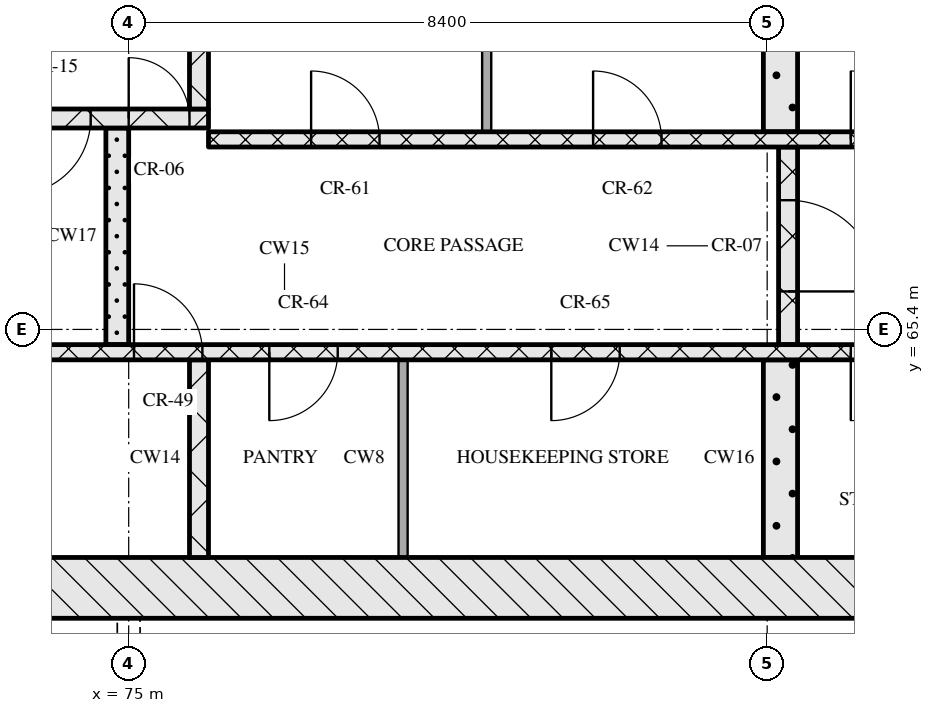
"""IFC4 building model, lengths in metres.
Left out: names, types, materials, properties, quantities, classifications, styles, units other than length and angle.
Written with IfcOpenShell. Run it as: python <this file> out.ifc"""

import sys

from ifc_helpers import new_model, si_unit, direction, frame, frame_2d, origin, place, context, subcontext, project, spatial, rectangle, extrude, element, fill, save


model = new_model("IFC4")
c1 = context("Model", 3, precision=1e-05, world=origin(), true_north=direction((0.0, 1.0)))
c2 = subcontext(c1, "Body", "Model", "MODEL_VIEW")
j1 = project(units=[si_unit("LENGTHUNIT", "METRE"), si_unit("PLANEANGLEUNIT", "RADIAN")], contexts=[c1])
p1 = place(None, origin())
s1 = spatial("IfcSite", under=j1, at=p1, CompositionType="ELEMENT")
p2 = place(p1, origin())
s2 = spatial("IfcBuilding", under=s1, at=p2, CompositionType="ELEMENT")
p3 = place(p2, frame((0.0, 0.0, 169.05)))
s3 = spatial("IfcBuildingStorey", under=s2, at=p3, CompositionType="ELEMENT", Elevation=169.05)
p4 = place(p3, frame((67.0, 62.0, 0.0), z_axis=(0.0, 0.0, 1.0), x_axis=(1.0, 0.0, 0.0)))
e1 = element("IfcWall", 1, at=p4, inside=s3, PredefinedType="SOLIDWALL", context=c2, shape_type="SweptSolid", body=[
    extrude(rectangle(XDim=41.2, YDim=0.8, at=frame_2d((20.6, 0.0))), origin(), (0.0, 0.0, 1.0), 3.32),
])
p5 = place(p4, frame((20.95, 0.0, 0.0)))
e2 = element("IfcOpeningElement", 2, at=p5, cuts=e1, PredefinedType="OPENING", context=c2, shape_type="SweptSolid", body=[
    extrude(rectangle(XDim=1.8, YDim=2.1, at=frame_2d((0.9, 1.05))), frame((0.0, 0.41, 0.0), z_axis=(0.0, -1.0, 0.0), x_axis=(1.0, 0.0, 0.0)), (0.0, 0.0, 1.0), 0.82),
])
p6 = place(p3, frame((75.925, 62.4, 0.0), z_axis=(0.0, 0.0, 1.0), x_axis=(0.0, 1.0, 0.0)))
e3 = element("IfcWall", 3, at=p6, inside=s3, PredefinedType="SOLIDWALL", context=c2, shape_type="SweptSolid", body=[
    extrude(rectangle(XDim=2.6, YDim=0.25, at=frame_2d((1.3, 0.0))), origin(), (0.0, 0.0, 1.0), 3.32),
])
p7 = place(p3, frame((78.61, 62.4, 0.0), z_axis=(0.0, 0.0, 1.0), x_axis=(0.0, 1.0, 0.0)))
e4 = element("IfcWall", 4, at=p7, inside=s3, PredefinedType="PARTITIONING", context=c2, shape_type="SweptSolid", body=[
    extrude(rectangle(XDim=2.6, YDim=0.12, at=frame_2d((1.3, 0.0))), origin(), (0.0, 0.0, 1.0), 3.32),
])
p8 = place(p3, frame((83.575, 62.4, 0.0), z_axis=(0.0, 0.0, 1.0), x_axis=(0.0, 1.0, 0.0)))
e5 = element("IfcWall", 5, at=p8, inside=s3, PredefinedType="SOLIDWALL", context=c2, shape_type="SweptSolid", body=[
    extrude(rectangle(XDim=2.6, YDim=0.45, at=frame_2d((1.3, 0.0))), origin(), (0.0, 0.0, 1.0), 3.32),
])
p9 = place(p3, frame((67.8, 65.1, 0.0), z_axis=(0.0, 0.0, 1.0), x_axis=(1.0, 0.0, 0.0)))
e6 = element("IfcWall", 6, at=p9, inside=s3, PredefinedType="SOLIDWALL", context=c2, shape_type="SweptSolid", body=[
    extrude(rectangle(XDim=18.5, YDim=0.2, at=frame_2d((9.25, 0.0))), origin(), (0.0, 0.0, 1.0), 3.32),
])
p10 = place(p9, frame((7.27, 0.0, 0.0)))
e7 = element("IfcOpeningElement", 7, at=p10, cuts=e6, PredefinedType="OPENING", context=c2, shape_type="SweptSolid", body=[
    extrude(rectangle(XDim=0.9, YDim=2.1, at=frame_2d((0.45, 1.05))), frame((0.0, 0.11, 0.0), z_axis=(0.0, -1.0, 0.0), x_axis=(1.0, 0.0, 0.0)), (0.0, 0.0, 1.0), 0.22),
])
p11 = place(p9, frame((9.05, 0.0, 0.0)))
e8 = element("IfcOpeningElement", 8, at=p11, cuts=e6, PredefinedType="OPENING", context=c2, shape_type="SweptSolid", body=[
    extrude(rectangle(XDim=0.9, YDim=2.1, at=frame_2d((0.45, 1.05))), frame((0.0, 0.11, 0.0), z_axis=(0.0, -1.0, 0.0), x_axis=(1.0, 0.0, 0.0)), (0.0, 0.0, 1.0), 0.22),
])
p12 = place(p9, frame((12.76, 0.0, 0.0)))
e9 = element("IfcOpeningElement", 9, at=p12, cuts=e6, PredefinedType="OPENING", context=c2, shape_type="SweptSolid", body=[
    extrude(rectangle(XDim=0.9, YDim=2.1, at=frame_2d((0.45, 1.05))), frame((0.0, 0.11, 0.0), z_axis=(0.0, -1.0, 0.0), x_axis=(1.0, 0.0, 0.0)), (0.0, 0.0, 1.0), 0.22),
])
p13 = place(p9, frame((16.7, 0.0, 0.0)))
e10 = element("IfcOpeningElement", 10, at=p13, cuts=e6, PredefinedType="OPENING", context=c2, shape_type="SweptSolid", body=[
    extrude(rectangle(XDim=0.9, YDim=2.1, at=frame_2d((0.45, 1.05))), frame((0.0, 0.11, 0.0), z_axis=(0.0, -1.0, 0.0), x_axis=(1.0, 0.0, 0.0)), (0.0, 0.0, 1.0), 0.22),
])
p14 = place(p3, frame((74.85, 65.2, 0.0), z_axis=(0.0, 0.0, 1.0), x_axis=(0.0, 1.0, 0.0)))
e11 = element("IfcWall", 11, at=p14, inside=s3, PredefinedType="SOLIDWALL", context=c2, shape_type="SweptSolid", body=[
    extrude(rectangle(XDim=2.85, YDim=0.3, at=frame_2d((1.425, 0.0))), origin(), (0.0, 0.0, 1.0), 3.32),
])
p15 = place(p3, frame((83.675, 65.2, 0.0), z_axis=(0.0, 0.0, 1.0), x_axis=(0.0, 1.0, 0.0)))
e12 = element("IfcWall", 12, at=p15, inside=s3, PredefinedType="SOLIDWALL", context=c2, shape_type="SweptSolid", body=[
    extrude(rectangle(XDim=2.6, YDim=0.25, at=frame_2d((1.3, 0.0))), origin(), (0.0, 0.0, 1.0), 3.32),
])
p16 = place(p15, frame((0.7, 0.0, 0.0)))
e13 = element("IfcOpeningElement", 13, at=p16, cuts=e12, PredefinedType="OPENING", context=c2, shape_type="SweptSolid", body=[
    extrude(rectangle(XDim=1.2, YDim=2.1, at=frame_2d((0.6, 1.05))), frame((0.0, 0.135, 0.0), z_axis=(0.0, -1.0, 0.0), x_axis=(1.0, 0.0, 0.0)), (0.0, 0.0, 1.0), 0.27),
])
p17 = place(p3, frame((76.05, 67.9, 0.0), z_axis=(0.0, 0.0, 1.0), x_axis=(1.0, 0.0, 0.0)))
e14 = element("IfcWall", 14, at=p17, inside=s3, PredefinedType="SOLIDWALL", context=c2, shape_type="SweptSolid", body=[
    extrude(rectangle(XDim=23.1, YDim=0.2, at=frame_2d((11.55, 0.0))), origin(), (0.0, 0.0, 1.0), 3.32),
])
p18 = place(p17, frame((1.35, 0.0, 0.0)))
e15 = element("IfcOpeningElement", 15, at=p18, cuts=e14, PredefinedType="OPENING", context=c2, shape_type="SweptSolid", body=[
    extrude(rectangle(XDim=0.9, YDim=2.1, at=frame_2d((0.45, 1.05))), frame((0.0, 0.11, 0.0), z_axis=(0.0, -1.0, 0.0), x_axis=(1.0, 0.0, 0.0)), (0.0, 0.0, 1.0), 0.22),
])
p19 = place(p17, frame((5.06, 0.0, 0.0)))
e16 = element("IfcOpeningElement", 16, at=p19, cuts=e14, PredefinedType="OPENING", context=c2, shape_type="SweptSolid", body=[
    extrude(rectangle(XDim=0.9, YDim=2.1, at=frame_2d((0.45, 1.05))), frame((0.0, 0.11, 0.0), z_axis=(0.0, -1.0, 0.0), x_axis=(1.0, 0.0, 0.0)), (0.0, 0.0, 1.0), 0.22),
])
p20 = place(p17, frame((8.45, 0.0, 0.0)))
e17 = element("IfcOpeningElement", 17, at=p20, cuts=e14, PredefinedType="OPENING", context=c2, shape_type="SweptSolid", body=[
    extrude(rectangle(XDim=0.9, YDim=2.1, at=frame_2d((0.45, 1.05))), frame((0.0, 0.11, 0.0), z_axis=(0.0, -1.0, 0.0), x_axis=(1.0, 0.0, 0.0)), (0.0, 0.0, 1.0), 0.22),
])
p21 = place(p17, frame((10.91, 0.0, 0.0)))
e18 = element("IfcOpeningElement", 18, at=p21, cuts=e14, PredefinedType="OPENING", context=c2, shape_type="SweptSolid", body=[
    extrude(rectangle(XDim=0.9, YDim=2.1, at=frame_2d((0.45, 1.05))), frame((0.0, 0.11, 0.0), z_axis=(0.0, -1.0, 0.0), x_axis=(1.0, 0.0, 0.0)), (0.0, 0.0, 1.0), 0.22),
])
p22 = place(p17, frame((13.55, 0.0, 0.0)))
e19 = element("IfcOpeningElement", 19, at=p22, cuts=e14, PredefinedType="OPENING", context=c2, shape_type="SweptSolid", body=[
    extrude(rectangle(XDim=1.0, YDim=2.1, at=frame_2d((0.5, 1.05))), frame((0.0, 0.11, 0.0), z_axis=(0.0, -1.0, 0.0), x_axis=(1.0, 0.0, 0.0)), (0.0, 0.0, 1.0), 0.22),
])
p23 = place(p17, frame((16.2, 0.0, 0.0)))
e20 = element("IfcOpeningElement", 20, at=p23, cuts=e14, PredefinedType="OPENING", context=c2, shape_type="SweptSolid", body=[
    extrude(rectangle(XDim=1.1, YDim=2.1, at=frame_2d((0.55, 1.05))), frame((0.0, 0.11, 0.0), z_axis=(0.0, -1.0, 0.0), x_axis=(1.0, 0.0, 0.0)), (0.0, 0.0, 1.0), 0.22),
])
p24 = place(p17, frame((18.7, 0.0, 0.0)))
e21 = element("IfcOpeningElement", 21, at=p24, cuts=e14, PredefinedType="OPENING", context=c2, shape_type="SweptSolid", body=[
    extrude(rectangle(XDim=1.1, YDim=2.1, at=frame_2d((0.55, 1.05))), frame((0.0, 0.11, 0.0), z_axis=(0.0, -1.0, 0.0), x_axis=(1.0, 0.0, 0.0)), (0.0, 0.0, 1.0), 0.22),
])
p25 = place(p17, frame((21.2, 0.0, 0.0)))
e22 = element("IfcOpeningElement", 22, at=p25, cuts=e14, PredefinedType="OPENING", context=c2, shape_type="SweptSolid", body=[
    extrude(rectangle(XDim=1.1, YDim=2.1, at=frame_2d((0.55, 1.05))), frame((0.0, 0.11, 0.0), z_axis=(0.0, -1.0, 0.0), x_axis=(1.0, 0.0, 0.0)), (0.0, 0.0, 1.0), 0.22),
])
p26 = place(p3, frame((79.71, 68.0, 0.0), z_axis=(0.0, 0.0, 1.0), x_axis=(0.0, 1.0, 0.0)))
e23 = element("IfcWall", 23, at=p26, inside=s3, PredefinedType="PARTITIONING", context=c2, shape_type="SweptSolid", body=[
    extrude(rectangle(XDim=2.6, YDim=0.12, at=frame_2d((1.3, 0.0))), origin(), (0.0, 0.0, 1.0), 3.32),
])
p27 = place(p3, frame((83.575, 68.0, 0.0), z_axis=(0.0, 0.0, 1.0), x_axis=(0.0, 1.0, 0.0)))
e24 = element("IfcWall", 24, at=p27, inside=s3, PredefinedType="SOLIDWALL", context=c2, shape_type="SweptSolid", body=[
    extrude(rectangle(XDim=2.6, YDim=0.45, at=frame_2d((1.3, 0.0))), origin(), (0.0, 0.0, 1.0), 3.32),
])
p28 = place(p3, frame((67.8, 68.175, 0.0), z_axis=(0.0, 0.0, 1.0), x_axis=(1.0, 0.0, 0.0)))
e25 = element("IfcWall", 25, at=p28, inside=s3, PredefinedType="SOLIDWALL", context=c2, shape_type="SweptSolid", body=[
    extrude(rectangle(XDim=8.25, YDim=0.25, at=frame_2d((4.125, 0.0))), origin(), (0.0, 0.0, 1.0), 3.32),
])
p29 = place(p28, frame((5.7, 0.0, 0.0)))
e26 = element("IfcOpeningElement", 26, at=p29, cuts=e25, PredefinedType="OPENING", context=c2, shape_type="SweptSolid", body=[
    extrude(rectangle(XDim=1.0, YDim=2.1, at=frame_2d((0.5, 1.05))), frame((0.0, 0.135, 0.0), z_axis=(0.0, -1.0, 0.0), x_axis=(1.0, 0.0, 0.0)), (0.0, 0.0, 1.0), 0.27),
])
p30 = place(p28, frame((7.2, 0.0, 0.0)))
e27 = element("IfcOpeningElement", 27, at=p30, cuts=e25, PredefinedType="OPENING", context=c2, shape_type="SweptSolid", body=[
    extrude(rectangle(XDim=0.8, YDim=2.1, at=frame_2d((0.4, 1.05))), frame((0.0, 0.135, 0.0), z_axis=(0.0, -1.0, 0.0), x_axis=(1.0, 0.0, 0.0)), (0.0, 0.0, 1.0), 0.27),
])
p31 = place(p3, frame((75.925, 68.3, 0.0), z_axis=(0.0, 0.0, 1.0), x_axis=(0.0, 1.0, 0.0)))
e28 = element("IfcWall", 28, at=p31, inside=s3, PredefinedType="SOLIDWALL", context=c2, shape_type="SweptSolid", body=[
    extrude(rectangle(XDim=2.3, YDim=0.25, at=frame_2d((1.15, 0.0))), origin(), (0.0, 0.0, 1.0), 3.32),
])
p32 = place(p10, origin())
e29 = element("IfcDoor", 29, at=p32, inside=s3, OperationType="SINGLE_SWING_LEFT", PredefinedType="DOOR", context=c2, shape_type="SweptSolid", body=[
    extrude(rectangle(XDim=0.9, YDim=2.1, at=frame_2d((0.45, 1.05))), frame((0.0, 0.025, 0.0), z_axis=(0.0, -1.0, 0.0), x_axis=(1.0, 0.0, 0.0)), (0.0, 0.0, 1.0), 0.05),
])
fill(e7, e29)
p33 = place(p11, origin())
e30 = element("IfcDoor", 30, at=p33, inside=s3, OperationType="SINGLE_SWING_RIGHT", PredefinedType="DOOR", context=c2, shape_type="SweptSolid", body=[
    extrude(rectangle(XDim=0.9, YDim=2.1, at=frame_2d((0.45, 1.05))), frame((0.0, 0.025, 0.0), z_axis=(0.0, -1.0, 0.0), x_axis=(1.0, 0.0, 0.0)), (0.0, 0.0, 1.0), 0.05),
])
fill(e8, e30)
p34 = place(p12, origin())
e31 = element("IfcDoor", 31, at=p34, inside=s3, OperationType="SINGLE_SWING_RIGHT", PredefinedType="DOOR", context=c2, shape_type="SweptSolid", body=[
    extrude(rectangle(XDim=0.9, YDim=2.1, at=frame_2d((0.45, 1.05))), frame((0.0, 0.025, 0.0), z_axis=(0.0, -1.0, 0.0), x_axis=(1.0, 0.0, 0.0)), (0.0, 0.0, 1.0), 0.05),
])
fill(e9, e31)
p35 = place(p13, origin())
e32 = element("IfcDoor", 32, at=p35, inside=s3, OperationType="SINGLE_SWING_RIGHT", PredefinedType="DOOR", context=c2, shape_type="SweptSolid", body=[
    extrude(rectangle(XDim=0.9, YDim=2.1, at=frame_2d((0.45, 1.05))), frame((0.0, 0.025, 0.0), z_axis=(0.0, -1.0, 0.0), x_axis=(1.0, 0.0, 0.0)), (0.0, 0.0, 1.0), 0.05),
])
fill(e10, e32)
p36 = place(p16, origin())
e33 = element("IfcDoor", 33, at=p36, inside=s3, OperationType="SINGLE_SWING_RIGHT", PredefinedType="DOOR", context=c2, shape_type="SweptSolid", body=[
    extrude(rectangle(XDim=1.2, YDim=2.1, at=frame_2d((0.6, 1.05))), frame((0.0, 0.025, 0.0), z_axis=(0.0, -1.0, 0.0), x_axis=(1.0, 0.0, 0.0)), (0.0, 0.0, 1.0), 0.05),
])
fill(e13, e33)
p37 = place(p18, origin())
e34 = element("IfcDoor", 34, at=p37, inside=s3, OperationType="SINGLE_SWING_LEFT", PredefinedType="DOOR", context=c2, shape_type="SweptSolid", body=[
    extrude(rectangle(XDim=0.9, YDim=2.1, at=frame_2d((0.45, 1.05))), frame((0.0, 0.025, 0.0), z_axis=(0.0, -1.0, 0.0), x_axis=(1.0, 0.0, 0.0)), (0.0, 0.0, 1.0), 0.05),
])
fill(e15, e34)
p38 = place(p19, origin())
e35 = element("IfcDoor", 35, at=p38, inside=s3, OperationType="SINGLE_SWING_LEFT", PredefinedType="DOOR", context=c2, shape_type="SweptSolid", body=[
    extrude(rectangle(XDim=0.9, YDim=2.1, at=frame_2d((0.45, 1.05))), frame((0.0, 0.025, 0.0), z_axis=(0.0, -1.0, 0.0), x_axis=(1.0, 0.0, 0.0)), (0.0, 0.0, 1.0), 0.05),
])
fill(e16, e35)
p39 = place(p20, origin())
e36 = element("IfcDoor", 36, at=p39, inside=s3, OperationType="SINGLE_SWING_LEFT", PredefinedType="DOOR", context=c2, shape_type="SweptSolid", body=[
    extrude(rectangle(XDim=0.9, YDim=2.1, at=frame_2d((0.45, 1.05))), frame((0.0, 0.025, 0.0), z_axis=(0.0, -1.0, 0.0), x_axis=(1.0, 0.0, 0.0)), (0.0, 0.0, 1.0), 0.05),
])
fill(e17, e36)
p40 = place(p29, origin())
e37 = element("IfcDoor", 37, at=p40, inside=s3, OperationType="SINGLE_SWING_RIGHT", PredefinedType="DOOR", context=c2, shape_type="SweptSolid", body=[
    extrude(rectangle(XDim=1.0, YDim=2.1, at=frame_2d((0.5, 1.05))), frame((0.0, 0.025, 0.0), z_axis=(0.0, -1.0, 0.0), x_axis=(1.0, 0.0, 0.0)), (0.0, 0.0, 1.0), 0.05),
])
fill(e26, e37)
p41 = place(p30, origin())
e38 = element("IfcDoor", 38, at=p41, inside=s3, OperationType="SINGLE_SWING_LEFT", PredefinedType="DOOR", context=c2, shape_type="SweptSolid", body=[
    extrude(rectangle(XDim=0.8, YDim=2.1, at=frame_2d((0.4, 1.05))), frame((0.0, 0.025, 0.0), z_axis=(0.0, -1.0, 0.0), x_axis=(1.0, 0.0, 0.0)), (0.0, 0.0, 1.0), 0.05),
])
fill(e27, e38)
save(model, sys.argv[1])
